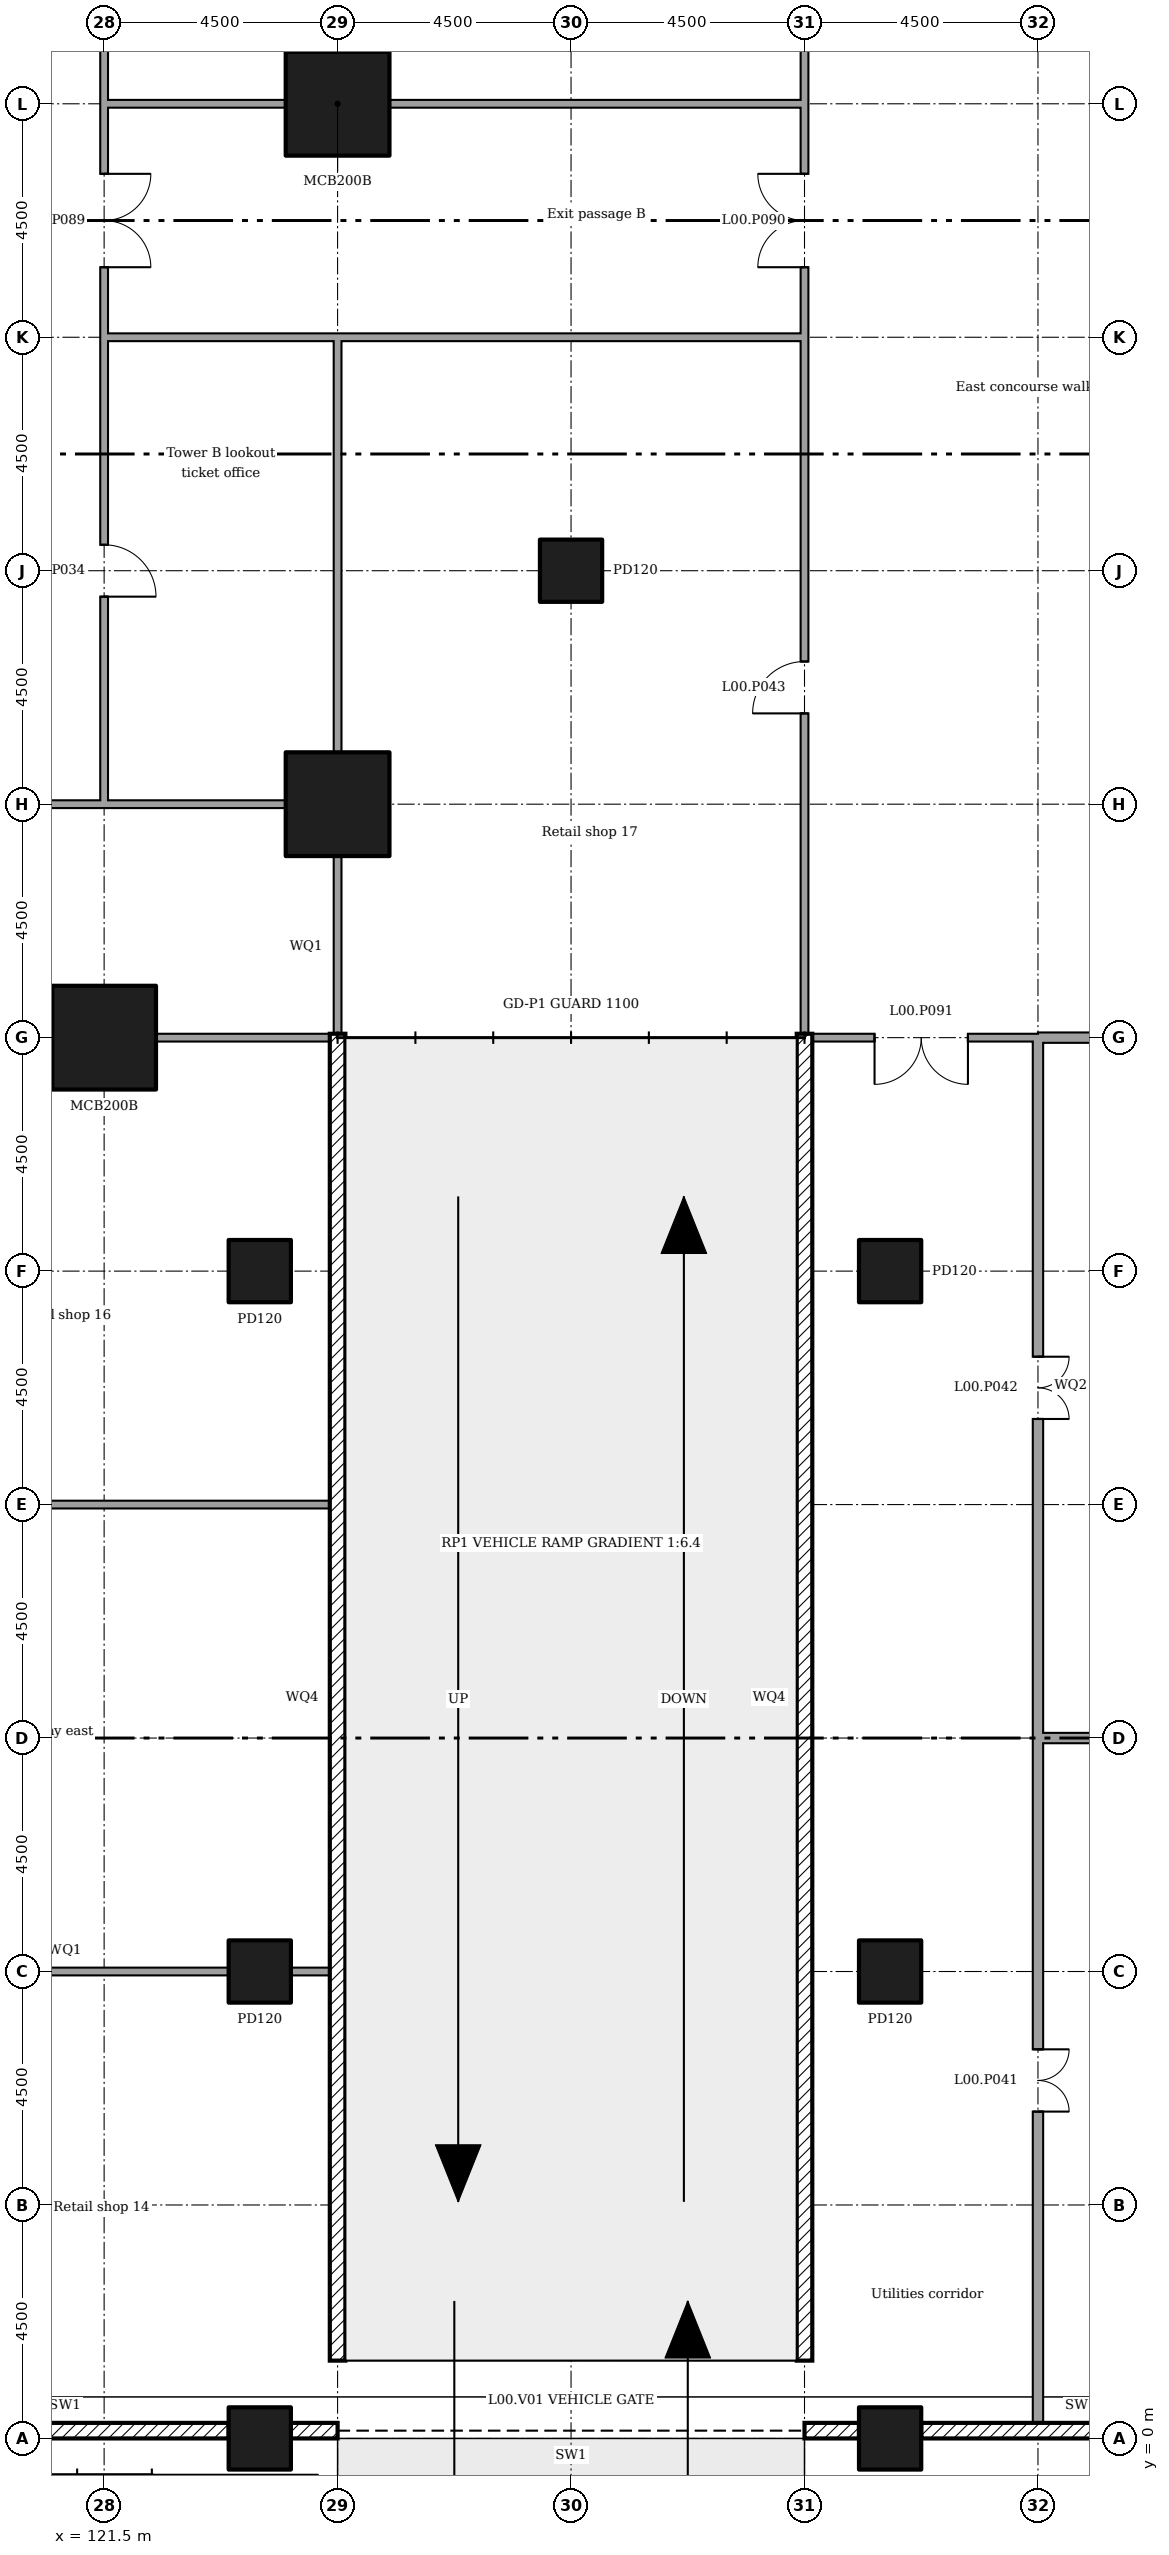
"""IFC4 building model, lengths in metres.
Left out: names, types, materials, properties, quantities, classifications, styles, units other than length and angle.
Written with IfcOpenShell. Run it as: python <this file> out.ifc"""

import sys

from ifc_helpers import new_model, si_unit, direction, frame, frame_2d, origin, origin_2d, place, context, subcontext, project, spatial, rectangle, extrude, element, fill, save


model = new_model("IFC4")
c1 = context("Model", 3, precision=1e-05, world=origin(), true_north=direction((0.0, 1.0)))
c2 = subcontext(c1, "Body", "Model", "MODEL_VIEW")
j1 = project(units=[si_unit("LENGTHUNIT", "METRE"), si_unit("PLANEANGLEUNIT", "RADIAN")], contexts=[c1])
p1 = place(None, origin())
s1 = spatial("IfcSite", under=j1, at=p1, CompositionType="ELEMENT")
p2 = place(p1, origin())
s2 = spatial("IfcBuilding", under=s1, at=p2, CompositionType="ELEMENT")
p3 = place(p2, origin())
s3 = spatial("IfcBuildingStorey", under=s2, at=p3, CompositionType="ELEMENT", Elevation=0.0)
for number, where in (
    (1, (121.5, 27.0, 0.0)),
    (2, (126.0, 31.5, 0.0)),
    (3, (126.0, 45.0, 0.0)),
):
    element("IfcColumn", number, at=place(p3, frame(where)), inside=s3, PredefinedType="COLUMN", context=c2, shape_type="SweptSolid", body=[
        extrude(rectangle(XDim=2.0, YDim=2.0, at=origin_2d()), origin(), (0.0, 0.0, 1.0), 6.0),
    ])
for number, where in (
    (4, (124.5, 0.0, 0.0)),
    (5, (124.5, 9.0, 0.0)),
    (6, (124.5, 22.5, 0.0)),
    (7, (130.5, 36.0, 0.0)),
    (8, (136.65, 0.0, 0.0)),
    (9, (136.65, 9.0, 0.0)),
    (10, (136.65, 22.5, 0.0)),
):
    element("IfcColumn", number, at=place(p3, frame(where)), inside=s3, PredefinedType="COLUMN", context=c2, shape_type="SweptSolid", body=[
        extrude(rectangle(XDim=1.2, YDim=1.2, at=origin_2d()), origin(), (0.0, 0.0, 1.0), 6.0),
    ])
p4 = place(p3, frame((117.6, 0.15, 0.0)))
e11 = element("IfcWall", 11, at=p4, inside=s3, PredefinedType="ELEMENTEDWALL", context=c2, shape_type="SweptSolid", body=[
    extrude(rectangle(XDim=6.3, YDim=0.3, at=frame_2d((3.15, 0.0))), origin(), (0.0, 0.0, 1.0), 5.55),
])
p5 = place(p3, frame((125.1, 0.15, 0.0)))
e12 = element("IfcWall", 12, at=p5, inside=s3, PredefinedType="ELEMENTEDWALL", context=c2, shape_type="SweptSolid", body=[
    extrude(rectangle(XDim=0.4, YDim=0.3, at=frame_2d((0.2, 0.0))), origin(), (0.0, 0.0, 1.0), 5.55),
])
p6 = place(p3, frame((125.5, 0.15, 0.0)))
e13 = element("IfcWall", 13, at=p6, inside=s3, PredefinedType="ELEMENTEDWALL", context=c2, shape_type="SweptSolid", body=[
    extrude(rectangle(XDim=10.0, YDim=0.3, at=frame_2d((5.0, 0.0))), origin(), (0.0, 0.0, 1.0), 4.05),
])
p7 = place(p6, frame((0.5, 0.0, 0.0)))
e14 = element("IfcOpeningElement", 14, at=p7, cuts=e13, PredefinedType="OPENING", context=c2, shape_type="SweptSolid", body=[
    extrude(rectangle(XDim=9.0, YDim=3.5, at=frame_2d((4.5, 1.75))), frame((0.0, 0.16, 0.0), z_axis=(0.0, -1.0, 0.0), x_axis=(1.0, 0.0, 0.0)), (0.0, 0.0, 1.0), 0.32),
])
p8 = place(p3, frame((135.5, 0.15, 0.0)))
e15 = element("IfcWall", 15, at=p8, inside=s3, PredefinedType="ELEMENTEDWALL", context=c2, shape_type="SweptSolid", body=[
    extrude(rectangle(XDim=0.55, YDim=0.3, at=frame_2d((0.275, 0.0))), origin(), (0.0, 0.0, 1.0), 4.05),
])
p9 = place(p3, frame((137.25, 0.15, 0.0)))
e16 = element("IfcWall", 16, at=p9, inside=s3, PredefinedType="ELEMENTEDWALL", context=c2, shape_type="SweptSolid", body=[
    extrude(rectangle(XDim=6.15, YDim=0.3, at=frame_2d((3.075, 0.0))), origin(), (0.0, 0.0, 1.0), 5.55),
])
p10 = place(p3, frame((117.52, 31.5, 0.0)))
e17 = element("IfcWall", 17, at=p10, inside=s3, PredefinedType="PARTITIONING", context=c2, shape_type="SweptSolid", body=[
    extrude(rectangle(XDim=4.055, YDim=0.15, at=frame_2d((2.027, 0.0))), origin(), (0.0, 0.0, 1.0), 5.55),
])
p11 = place(p3, frame((121.5, 31.575, 0.0), z_axis=(0.0, 0.0, 1.0), x_axis=(0.0, 1.0, 0.0)))
e18 = element("IfcWall", 18, at=p11, inside=s3, PredefinedType="PARTITIONING", context=c2, shape_type="SweptSolid", body=[
    extrude(rectangle(XDim=9.0, YDim=0.15, at=frame_2d((4.5, 0.0))), origin(), (0.0, 0.0, 1.0), 5.55),
])
p12 = place(p11, frame((3.925, 0.0, 0.0)))
e19 = element("IfcOpeningElement", 19, at=p12, cuts=e18, PredefinedType="OPENING", context=c2, shape_type="SweptSolid", body=[
    extrude(rectangle(XDim=1.0, YDim=2.1, at=frame_2d((0.5, 1.05))), frame((0.0, 0.085, 0.0), z_axis=(0.0, -1.0, 0.0), x_axis=(1.0, 0.0, 0.0)), (0.0, 0.0, 1.0), 0.17),
])
p13 = place(p3, frame((121.5, 40.5, 0.0), z_axis=(0.0, 0.0, 1.0), x_axis=(0.0, 1.0, 0.0)))
e20 = element("IfcWall", 20, at=p13, inside=s3, PredefinedType="PARTITIONING", context=c2, shape_type="SweptSolid", body=[
    extrude(rectangle(XDim=4.575, YDim=0.15, at=frame_2d((2.288, 0.0))), origin(), (0.0, 0.0, 1.0), 5.55),
])
p14 = place(p13, frame((1.35, 0.0, 0.0)))
e21 = element("IfcOpeningElement", 21, at=p14, cuts=e20, PredefinedType="OPENING", context=c2, shape_type="SweptSolid", body=[
    extrude(rectangle(XDim=1.8, YDim=2.1, at=frame_2d((0.9, 1.05))), frame((0.0, 0.085, 0.0), z_axis=(0.0, -1.0, 0.0), x_axis=(1.0, 0.0, 0.0)), (0.0, 0.0, 1.0), 0.17),
])
p15 = place(p3, frame((121.5, 45.0, 0.0), z_axis=(0.0, 0.0, 1.0), x_axis=(0.0, 1.0, 0.0)))
e22 = element("IfcWall", 22, at=p15, inside=s3, PredefinedType="PARTITIONING", context=c2, shape_type="SweptSolid", body=[
    extrude(rectangle(XDim=3.98, YDim=0.15, at=frame_2d((1.99, 0.0))), origin(), (0.0, 0.0, 1.0), 5.55),
])
p16 = place(p15, frame((1.5, 0.0, 0.0)))
e23 = element("IfcOpeningElement", 23, at=p16, cuts=e22, PredefinedType="OPENING", context=c2, shape_type="SweptSolid", body=[
    extrude(rectangle(XDim=1.0, YDim=2.1, at=frame_2d((0.5, 1.05))), frame((0.0, 0.085, 0.0), z_axis=(0.0, -1.0, 0.0), x_axis=(1.0, 0.0, 0.0)), (0.0, 0.0, 1.0), 0.17),
])
p17 = place(p3, frame((121.5, 31.5, 0.0)))
e24 = element("IfcWall", 24, at=p17, inside=s3, PredefinedType="PARTITIONING", context=c2, shape_type="SweptSolid", body=[
    extrude(rectangle(XDim=3.505, YDim=0.15, at=frame_2d((1.752, 0.0))), origin(), (0.0, 0.0, 1.0), 5.55),
])
p18 = place(p3, frame((113.495, 27.0, 0.0)))
e25 = element("IfcWall", 25, at=p18, inside=s3, PredefinedType="PARTITIONING", context=c2, shape_type="SweptSolid", body=[
    extrude(rectangle(XDim=7.01, YDim=0.15, at=frame_2d((3.505, 0.0))), origin(), (0.0, 0.0, 1.0), 5.55),
])
p19 = place(p3, frame((122.495, 27.0, 0.0)))
e26 = element("IfcWall", 26, at=p19, inside=s3, PredefinedType="PARTITIONING", context=c2, shape_type="SweptSolid", body=[
    extrude(rectangle(XDim=3.355, YDim=0.15, at=frame_2d((1.677, 0.0))), origin(), (0.0, 0.0, 1.0), 5.55),
])
p20 = place(p3, frame((126.0, 27.0, 0.0), z_axis=(0.0, 0.0, 1.0), x_axis=(0.0, 1.0, 0.0)))
e27 = element("IfcWall", 27, at=p20, inside=s3, PredefinedType="PARTITIONING", context=c2, shape_type="SweptSolid", body=[
    extrude(rectangle(XDim=3.505, YDim=0.15, at=frame_2d((1.752, 0.0))), origin(), (0.0, 0.0, 1.0), 5.55),
])
p21 = place(p3, frame((121.575, 40.5, 0.0)))
e28 = element("IfcWall", 28, at=p21, inside=s3, PredefinedType="PARTITIONING", context=c2, shape_type="SweptSolid", body=[
    extrude(rectangle(XDim=4.5, YDim=0.15, at=frame_2d((2.25, 0.0))), origin(), (0.0, 0.0, 1.0), 5.55),
])
p22 = place(p3, frame((126.0, 32.495, 0.0), z_axis=(0.0, 0.0, 1.0), x_axis=(0.0, 1.0, 0.0)))
e29 = element("IfcWall", 29, at=p22, inside=s3, PredefinedType="PARTITIONING", context=c2, shape_type="SweptSolid", body=[
    extrude(rectangle(XDim=7.93, YDim=0.15, at=frame_2d((3.965, 0.0))), origin(), (0.0, 0.0, 1.0), 5.55),
])
p23 = place(p3, frame((121.575, 45.0, 0.0)))
e30 = element("IfcWall", 30, at=p23, inside=s3, PredefinedType="PARTITIONING", context=c2, shape_type="SweptSolid", body=[
    extrude(rectangle(XDim=3.43, YDim=0.15, at=frame_2d((1.715, 0.0))), origin(), (0.0, 0.0, 1.0), 5.55),
])
p24 = place(p3, frame((126.0, 40.5, 0.0)))
e31 = element("IfcWall", 31, at=p24, inside=s3, PredefinedType="PARTITIONING", context=c2, shape_type="SweptSolid", body=[
    extrude(rectangle(XDim=9.075, YDim=0.15, at=frame_2d((4.538, 0.0))), origin(), (0.0, 0.0, 1.0), 5.55),
])
p25 = place(p3, frame((126.995, 45.0, 0.0)))
e32 = element("IfcWall", 32, at=p25, inside=s3, PredefinedType="PARTITIONING", context=c2, shape_type="SweptSolid", body=[
    extrude(rectangle(XDim=8.08, YDim=0.15, at=frame_2d((4.04, 0.0))), origin(), (0.0, 0.0, 1.0), 5.55),
])
p26 = place(p3, frame((135.0, 40.5, 0.0), z_axis=(0.0, 0.0, 1.0), x_axis=(0.0, 1.0, 0.0)))
e33 = element("IfcWall", 33, at=p26, inside=s3, PredefinedType="PARTITIONING", context=c2, shape_type="SweptSolid", body=[
    extrude(rectangle(XDim=4.425, YDim=0.15, at=frame_2d((2.212, 0.0))), origin(), (0.0, 0.0, 1.0), 5.55),
])
p27 = place(p26, frame((1.35, 0.0, 0.0)))
e34 = element("IfcOpeningElement", 34, at=p27, cuts=e33, PredefinedType="OPENING", context=c2, shape_type="SweptSolid", body=[
    extrude(rectangle(XDim=1.8, YDim=2.1, at=frame_2d((0.9, 1.05))), frame((0.0, 0.085, 0.0), z_axis=(0.0, -1.0, 0.0), x_axis=(1.0, 0.0, 0.0)), (0.0, 0.0, 1.0), 0.17),
])
p28 = place(p3, frame((126.0, 45.995, 0.0), z_axis=(0.0, 0.0, 1.0), x_axis=(0.0, 1.0, 0.0)))
e35 = element("IfcWall", 35, at=p28, inside=s3, PredefinedType="PARTITIONING", context=c2, shape_type="SweptSolid", body=[
    extrude(rectangle(XDim=7.01, YDim=0.15, at=frame_2d((3.505, 0.0))), origin(), (0.0, 0.0, 1.0), 5.55),
])
p29 = place(p3, frame((117.595, 9.0, 0.0)))
e36 = element("IfcWall", 36, at=p29, inside=s3, PredefinedType="PARTITIONING", context=c2, shape_type="SweptSolid", body=[
    extrude(rectangle(XDim=6.31, YDim=0.15, at=frame_2d((3.155, 0.0))), origin(), (0.0, 0.0, 1.0), 5.55),
])
p30 = place(p3, frame((125.095, 9.0, 0.0)))
e37 = element("IfcWall", 37, at=p30, inside=s3, PredefinedType="PARTITIONING", context=c2, shape_type="SweptSolid", body=[
    extrude(rectangle(XDim=0.905, YDim=0.15, at=frame_2d((0.453, 0.0))), origin(), (0.0, 0.0, 1.0), 5.55),
])
p31 = place(p3, frame((112.5, 18.0, 0.0)))
e38 = element("IfcWall", 38, at=p31, inside=s3, PredefinedType="PARTITIONING", context=c2, shape_type="SweptSolid", body=[
    extrude(rectangle(XDim=13.5, YDim=0.15, at=frame_2d((6.75, 0.0))), origin(), (0.0, 0.0, 1.0), 5.55),
])
p32 = place(p31, frame((6.25, 0.0, 0.0)))
e39 = element("IfcOpeningElement", 39, at=p32, cuts=e38, PredefinedType="OPENING", context=c2, shape_type="SweptSolid", body=[
    extrude(rectangle(XDim=1.0, YDim=2.1, at=frame_2d((0.5, 1.05))), frame((0.0, 0.085, 0.0), z_axis=(0.0, -1.0, 0.0), x_axis=(1.0, 0.0, 0.0)), (0.0, 0.0, 1.0), 0.17),
])
p33 = place(p3, frame((139.5, 0.3, 0.0), z_axis=(0.0, 0.0, 1.0), x_axis=(0.0, 1.0, 0.0)))
e40 = element("IfcWall", 40, at=p33, inside=s3, PredefinedType="SOLIDWALL", context=c2, shape_type="SweptSolid", body=[
    extrude(rectangle(XDim=13.3, YDim=0.2, at=frame_2d((6.65, 0.0))), origin(), (0.0, 0.0, 1.0), 5.55),
])
p34 = place(p33, frame((6.0, 0.0, 0.0)))
e41 = element("IfcOpeningElement", 41, at=p34, cuts=e40, PredefinedType="OPENING", context=c2, shape_type="SweptSolid", body=[
    extrude(rectangle(XDim=1.2, YDim=2.1, at=frame_2d((0.6, 1.05))), frame((0.0, 0.11, 0.0), z_axis=(0.0, -1.0, 0.0), x_axis=(1.0, 0.0, 0.0)), (0.0, 0.0, 1.0), 0.22),
])
p35 = place(p3, frame((139.5, 13.5, 0.0), z_axis=(0.0, 0.0, 1.0), x_axis=(0.0, 1.0, 0.0)))
e42 = element("IfcWall", 42, at=p35, inside=s3, PredefinedType="SOLIDWALL", context=c2, shape_type="SweptSolid", body=[
    extrude(rectangle(XDim=13.575, YDim=0.2, at=frame_2d((6.788, 0.0))), origin(), (0.0, 0.0, 1.0), 5.55),
])
p36 = place(p35, frame((6.15, 0.0, 0.0)))
e43 = element("IfcOpeningElement", 43, at=p36, cuts=e42, PredefinedType="OPENING", context=c2, shape_type="SweptSolid", body=[
    extrude(rectangle(XDim=1.2, YDim=2.1, at=frame_2d((0.6, 1.05))), frame((0.0, 0.11, 0.0), z_axis=(0.0, -1.0, 0.0), x_axis=(1.0, 0.0, 0.0)), (0.0, 0.0, 1.0), 0.22),
])
p37 = place(p3, frame((135.15, 27.0, 0.0)))
e44 = element("IfcWall", 44, at=p37, inside=s3, PredefinedType="PARTITIONING", context=c2, shape_type="SweptSolid", body=[
    extrude(rectangle(XDim=4.25, YDim=0.15, at=frame_2d((2.125, 0.0))), origin(), (0.0, 0.0, 1.0), 5.55),
])
p38 = place(p37, frame((1.2, 0.0, 0.0)))
e45 = element("IfcOpeningElement", 45, at=p38, cuts=e44, PredefinedType="OPENING", context=c2, shape_type="SweptSolid", body=[
    extrude(rectangle(XDim=1.8, YDim=2.1, at=frame_2d((0.9, 1.05))), frame((0.0, 0.085, 0.0), z_axis=(0.0, -1.0, 0.0), x_axis=(1.0, 0.0, 0.0)), (0.0, 0.0, 1.0), 0.17),
])
p39 = place(p3, frame((139.6, 13.5, 0.0)))
e46 = element("IfcWall", 46, at=p39, inside=s3, PredefinedType="SOLIDWALL", context=c2, shape_type="SweptSolid", body=[
    extrude(rectangle(XDim=13.1, YDim=0.2, at=frame_2d((6.55, 0.0))), origin(), (0.0, 0.0, 1.0), 5.55),
])
p40 = place(p3, frame((139.5, 27.0, 0.0)))
e47 = element("IfcWall", 47, at=p40, inside=s3, PredefinedType="SOLIDWALL", context=c2, shape_type="SweptSolid", body=[
    extrude(rectangle(XDim=4.575, YDim=0.2, at=frame_2d((2.288, 0.0))), origin(), (0.0, 0.0, 1.0), 5.55),
])
p41 = place(p3, frame((135.0, 27.0, 0.0), z_axis=(0.0, 0.0, 1.0), x_axis=(0.0, 1.0, 0.0)))
e48 = element("IfcWall", 48, at=p41, inside=s3, PredefinedType="PARTITIONING", context=c2, shape_type="SweptSolid", body=[
    extrude(rectangle(XDim=13.425, YDim=0.15, at=frame_2d((6.712, 0.0))), origin(), (0.0, 0.0, 1.0), 5.55),
])
p42 = place(p41, frame((6.25, 0.0, 0.0)))
e49 = element("IfcOpeningElement", 49, at=p42, cuts=e48, PredefinedType="OPENING", context=c2, shape_type="SweptSolid", body=[
    extrude(rectangle(XDim=1.0, YDim=2.1, at=frame_2d((0.5, 1.05))), frame((0.0, 0.085, 0.0), z_axis=(0.0, -1.0, 0.0), x_axis=(1.0, 0.0, 0.0)), (0.0, 0.0, 1.0), 0.17),
])
p43 = place(p3, frame((135.0, 45.0, 0.0), z_axis=(0.0, 0.0, 1.0), x_axis=(0.0, 1.0, 0.0)))
e50 = element("IfcWall", 50, at=p43, inside=s3, PredefinedType="PARTITIONING", context=c2, shape_type="SweptSolid", body=[
    extrude(rectangle(XDim=13.575, YDim=0.15, at=frame_2d((6.788, 0.0))), origin(), (0.0, 0.0, 1.0), 5.55),
])
p44 = place(p43, frame((6.25, 0.0, 0.0)))
e51 = element("IfcOpeningElement", 51, at=p44, cuts=e50, PredefinedType="OPENING", context=c2, shape_type="SweptSolid", body=[
    extrude(rectangle(XDim=1.0, YDim=2.1, at=frame_2d((0.5, 1.05))), frame((0.0, 0.085, 0.0), z_axis=(0.0, -1.0, 0.0), x_axis=(1.0, 0.0, 0.0)), (0.0, 0.0, 1.0), 0.17),
])
for number, where, z_axis, x_axis in (
    (52, (126.0, 1.5, 0.0), (0.0, 0.0, 1.0), (0.0, 1.0, 0.0)),
    (53, (135.0, 1.5, 0.0), (0.0, 0.0, 1.0), (0.0, 1.0, 0.0)),
):
    element("IfcWall", number, at=place(p3, frame(where, z_axis=z_axis, x_axis=x_axis)), inside=s3, PredefinedType="SOLIDWALL", context=c2, shape_type="SweptSolid", body=[
        extrude(rectangle(XDim=25.575, YDim=0.3, at=frame_2d((12.788, 0.0))), origin(), (0.0, 0.0, 1.0), 1.1),
    ])
p45 = place(p7, origin())
e54 = element("IfcDoor", 54, at=p45, inside=s3, OperationType="ROLLINGUP", PredefinedType="NOTDEFINED", context=c2, shape_type="SweptSolid", body=[
    extrude(rectangle(XDim=9.0, YDim=3.5, at=frame_2d((4.5, 1.75))), frame((0.0, 0.025, 0.0), z_axis=(0.0, -1.0, 0.0), x_axis=(1.0, 0.0, 0.0)), (0.0, 0.0, 1.0), 0.05),
])
fill(e14, e54)
p46 = place(p12, frame((1.0, 0.0, 0.0), x_axis=(-1.0, 0.0, 0.0)))
e55 = element("IfcDoor", 55, at=p46, inside=s3, OperationType="SINGLE_SWING_LEFT", PredefinedType="DOOR", context=c2, shape_type="SweptSolid", body=[
    extrude(rectangle(XDim=1.0, YDim=2.1, at=frame_2d((0.5, 1.05))), frame((0.0, 0.025, 0.0), z_axis=(0.0, -1.0, 0.0), x_axis=(1.0, 0.0, 0.0)), (0.0, 0.0, 1.0), 0.05),
])
fill(e19, e55)
p47 = place(p34, frame((1.2, 0.0, 0.0), x_axis=(-1.0, 0.0, 0.0)))
e56 = element("IfcDoor", 56, at=p47, inside=s3, OperationType="DOUBLE_DOOR_SINGLE_SWING", PredefinedType="DOOR", context=c2, shape_type="SweptSolid", body=[
    extrude(rectangle(XDim=1.2, YDim=2.1, at=frame_2d((0.6, 1.05))), frame((0.0, 0.025, 0.0), z_axis=(0.0, -1.0, 0.0), x_axis=(1.0, 0.0, 0.0)), (0.0, 0.0, 1.0), 0.05),
])
fill(e41, e56)
p48 = place(p36, frame((1.2, 0.0, 0.0), x_axis=(-1.0, 0.0, 0.0)))
e57 = element("IfcDoor", 57, at=p48, inside=s3, OperationType="DOUBLE_DOOR_SINGLE_SWING", PredefinedType="DOOR", context=c2, shape_type="SweptSolid", body=[
    extrude(rectangle(XDim=1.2, YDim=2.1, at=frame_2d((0.6, 1.05))), frame((0.0, 0.025, 0.0), z_axis=(0.0, -1.0, 0.0), x_axis=(1.0, 0.0, 0.0)), (0.0, 0.0, 1.0), 0.05),
])
fill(e43, e57)
p49 = place(p42, origin())
e58 = element("IfcDoor", 58, at=p49, inside=s3, OperationType="SINGLE_SWING_RIGHT", PredefinedType="DOOR", context=c2, shape_type="SweptSolid", body=[
    extrude(rectangle(XDim=1.0, YDim=2.1, at=frame_2d((0.5, 1.05))), frame((0.0, 0.025, 0.0), z_axis=(0.0, -1.0, 0.0), x_axis=(1.0, 0.0, 0.0)), (0.0, 0.0, 1.0), 0.05),
])
fill(e49, e58)
p50 = place(p14, frame((1.8, 0.0, 0.0), x_axis=(-1.0, 0.0, 0.0)))
e59 = element("IfcDoor", 59, at=p50, inside=s3, OperationType="DOUBLE_DOOR_SINGLE_SWING", PredefinedType="DOOR", context=c2, shape_type="SweptSolid", body=[
    extrude(rectangle(XDim=1.8, YDim=2.1, at=frame_2d((0.9, 1.05))), frame((0.0, 0.025, 0.0), z_axis=(0.0, -1.0, 0.0), x_axis=(1.0, 0.0, 0.0)), (0.0, 0.0, 1.0), 0.05),
])
fill(e21, e59)
p51 = place(p27, origin())
e60 = element("IfcDoor", 60, at=p51, inside=s3, OperationType="DOUBLE_DOOR_SINGLE_SWING", PredefinedType="DOOR", context=c2, shape_type="SweptSolid", body=[
    extrude(rectangle(XDim=1.8, YDim=2.1, at=frame_2d((0.9, 1.05))), frame((0.0, 0.025, 0.0), z_axis=(0.0, -1.0, 0.0), x_axis=(1.0, 0.0, 0.0)), (0.0, 0.0, 1.0), 0.05),
])
fill(e34, e60)
p52 = place(p38, frame((1.8, 0.0, 0.0), x_axis=(-1.0, 0.0, 0.0)))
e61 = element("IfcDoor", 61, at=p52, inside=s3, OperationType="DOUBLE_DOOR_SINGLE_SWING", PredefinedType="DOOR", context=c2, shape_type="SweptSolid", body=[
    extrude(rectangle(XDim=1.8, YDim=2.1, at=frame_2d((0.9, 1.05))), frame((0.0, 0.025, 0.0), z_axis=(0.0, -1.0, 0.0), x_axis=(1.0, 0.0, 0.0)), (0.0, 0.0, 1.0), 0.05),
])
fill(e45, e61)
save(model, sys.argv[1])
